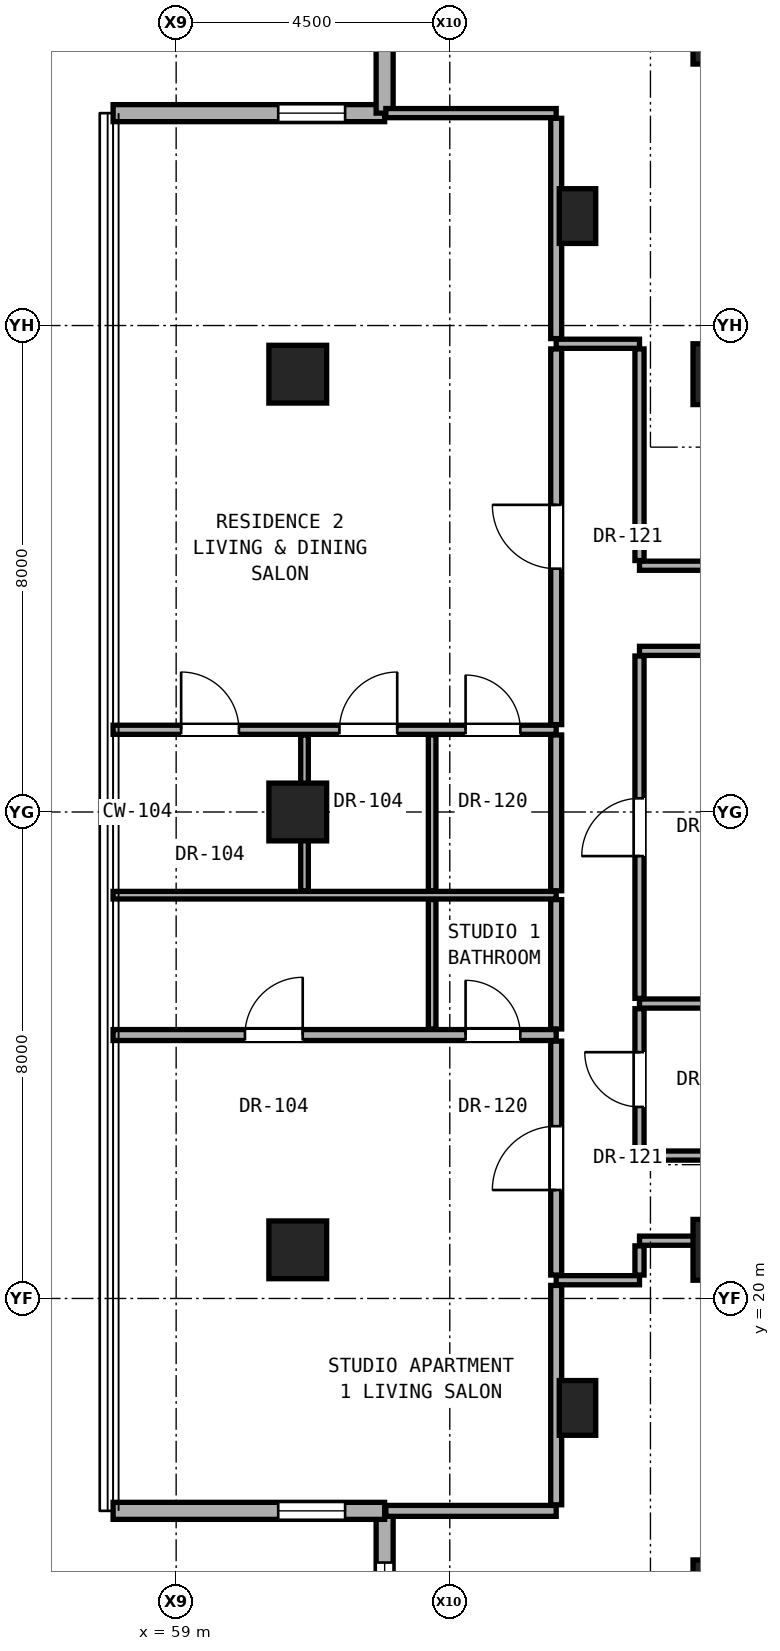
"""IFC4 building model, lengths in metres.
Left out: names, types, materials, properties, quantities, classifications, styles, units other than length and angle.
Written with IfcOpenShell. Run it as: python <this file> out.ifc"""

import sys

from ifc_helpers import new_model, si_unit, direction, frame, frame_2d, origin, origin_2d, place, context, subcontext, project, spatial, rectangle, hollow_rectangle, extrude, element, fill, save


model = new_model("IFC4")
c1 = context("Model", 3, precision=1e-05, world=origin(), true_north=direction((0.0, 1.0)))
c2 = subcontext(c1, "Body", "Model", "MODEL_VIEW")
j1 = project(units=[si_unit("LENGTHUNIT", "METRE"), si_unit("PLANEANGLEUNIT", "RADIAN")], contexts=[c1])
p1 = place(None, origin())
s1 = spatial("IfcSite", under=j1, at=p1, CompositionType="ELEMENT")
p2 = place(p1, origin())
s2 = spatial("IfcBuilding", under=s1, at=p2, CompositionType="ELEMENT")
p3 = place(p2, frame((0.0, 0.0, 180.4)))
s3 = spatial("IfcBuildingStorey", under=s2, at=p3, CompositionType="ELEMENT", Elevation=180.4)
for number, where, z_axis, x_axis in (
    (1, (68.0, 15.2, 0.0), (0.0, 0.0, 1.0), (1.0, 0.0, 0.0)),
    (2, (68.0, 20.8, 0.0), (0.0, 0.0, 1.0), (1.0, 0.0, 0.0)),
    (3, (68.0, 35.2, 0.0), (0.0, 0.0, 1.0), (1.0, 0.0, 0.0)),
    (4, (68.0, 40.8, 0.0), (0.0, 0.0, 1.0), (1.0, 0.0, 0.0)),
):
    element("IfcColumn", number, at=place(p3, frame(where, z_axis=z_axis, x_axis=x_axis)), inside=s3, PredefinedType="COLUMN", context=c2, shape_type="SweptSolid", body=[
        extrude(rectangle(XDim=1.0, YDim=1.0, at=origin_2d()), origin(), (0.0, 0.0, 1.0), 3.25),
    ])
for number, where, z_axis, x_axis in (
    (5, (61.0, 20.8, 0.0), (0.0, 0.0, 1.0), (1.0, 0.0, 0.0)),
    (6, (61.0, 28.0, 0.0), (0.0, 0.0, 1.0), (1.0, 0.0, 0.0)),
    (7, (61.0, 35.2, 0.0), (0.0, 0.0, 1.0), (1.0, 0.0, 0.0)),
):
    element("IfcColumn", number, at=place(p3, frame(where, z_axis=z_axis, x_axis=x_axis)), inside=s3, PredefinedType="COLUMN", context=c2, shape_type="SweptSolid", body=[
        extrude(hollow_rectangle(XDim=0.95, YDim=0.95, WallThickness=0.05, at=origin_2d()), origin(), (0.0, 0.0, 1.0), 3.25),
    ])
for number, where, z_axis, x_axis in (
    (8, (65.6, 18.2, 0.0), (0.0, 0.0, 1.0), (1.0, 0.0, 0.0)),
    (9, (65.6, 37.8, 0.0), (0.0, 0.0, 1.0), (1.0, 0.0, 0.0)),
):
    element("IfcColumn", number, at=place(p3, frame(where, z_axis=z_axis, x_axis=x_axis)), inside=s3, PredefinedType="PILASTER", context=c2, shape_type="SweptSolid", body=[
        extrude(rectangle(XDim=0.6, YDim=0.9, at=origin_2d()), origin(), (0.0, 0.0, 1.0), 3.25),
    ])
p4 = place(p3, frame((62.429, 16.507, 0.0), z_axis=(0.0, 0.0, 1.0), x_axis=(0.0, -1.0, 0.0)))
e10 = element("IfcWall", 10, at=p4, inside=s3, PredefinedType="SOLIDWALL", context=c2, shape_type="SweptSolid", body=[
    extrude(rectangle(XDim=4.465, YDim=0.28, at=frame_2d((2.233, 0.0))), origin(), (0.0, 0.0, 1.0), 3.03),
])
p5 = place(p4, frame((0.85, 0.0, 0.53)))
e11 = element("IfcOpeningElement", 11, at=p5, cuts=e10, PredefinedType="OPENING", context=c2, shape_type="SweptSolid", body=[
    extrude(rectangle(XDim=2.4, YDim=2.35, at=frame_2d((1.2, 1.175))), frame((0.0, 0.15, 0.0), z_axis=(0.0, -1.0, 0.0), x_axis=(1.0, 0.0, 0.0)), (0.0, 0.0, 1.0), 0.3),
])
p6 = place(p3, frame((57.963, 16.507, 0.0), z_axis=(0.0, 0.0, 1.0), x_axis=(1.0, 0.0, 0.0)))
e12 = element("IfcWall", 12, at=p6, inside=s3, PredefinedType="SOLIDWALL", context=c2, shape_type="SweptSolid", body=[
    extrude(rectangle(XDim=4.465, YDim=0.28, at=frame_2d((2.233, 0.0))), origin(), (0.0, 0.0, 1.0), 3.03),
])
p7 = place(p6, frame((2.715, 0.0, 0.85)))
e13 = element("IfcOpeningElement", 13, at=p7, cuts=e12, PredefinedType="OPENING", context=c2, shape_type="SweptSolid", body=[
    extrude(rectangle(XDim=1.1, YDim=2.0, at=frame_2d((0.55, 1.0))), frame((0.0, 0.15, 0.0), z_axis=(0.0, -1.0, 0.0), x_axis=(1.0, 0.0, 0.0)), (0.0, 0.0, 1.0), 0.3),
])
p8 = place(p3, frame((62.429, 39.493, 0.0), z_axis=(0.0, 0.0, 1.0), x_axis=(-1.0, 0.0, 0.0)))
e14 = element("IfcWall", 14, at=p8, inside=s3, PredefinedType="SOLIDWALL", context=c2, shape_type="SweptSolid", body=[
    extrude(rectangle(XDim=4.465, YDim=0.28, at=frame_2d((2.233, 0.0))), origin(), (0.0, 0.0, 1.0), 3.03),
])
p9 = place(p8, frame((0.65, 0.0, 0.85)))
e15 = element("IfcOpeningElement", 15, at=p9, cuts=e14, PredefinedType="OPENING", context=c2, shape_type="SweptSolid", body=[
    extrude(rectangle(XDim=1.1, YDim=2.0, at=frame_2d((0.55, 1.0))), frame((0.0, 0.15, 0.0), z_axis=(0.0, -1.0, 0.0), x_axis=(1.0, 0.0, 0.0)), (0.0, 0.0, 1.0), 0.3),
])
p10 = place(p3, frame((62.429, 43.958, 0.0), z_axis=(0.0, 0.0, 1.0), x_axis=(0.0, -1.0, 0.0)))
e16 = element("IfcWall", 16, at=p10, inside=s3, PredefinedType="SOLIDWALL", context=c2, shape_type="SweptSolid", body=[
    extrude(rectangle(XDim=4.465, YDim=0.28, at=frame_2d((2.233, 0.0))), origin(), (0.0, 0.0, 1.0), 3.03),
])
p11 = place(p3, frame((62.449, 16.507, 0.0), z_axis=(0.0, 0.0, 1.0), x_axis=(1.0, 0.0, 0.0)))
e17 = element("IfcWall", 17, at=p11, inside=s3, PredefinedType="PARTITIONING", context=c2, shape_type="SweptSolid", body=[
    extrude(rectangle(XDim=2.801, YDim=0.18, at=frame_2d((1.401, 0.0))), origin(), (0.0, 0.0, 1.0), 3.05),
])
p12 = place(p3, frame((65.25, 20.3, 0.0), z_axis=(0.0, 0.0, 1.0), x_axis=(1.0, 0.0, 0.0)))
e18 = element("IfcWall", 18, at=p12, inside=s3, PredefinedType="PARTITIONING", context=c2, shape_type="SweptSolid", body=[
    extrude(rectangle(XDim=1.37, YDim=0.15, at=frame_2d((0.685, 0.0))), origin(), (0.0, 0.0, 1.0), 3.05),
])
p13 = place(p3, frame((66.62, 20.95, 0.0), z_axis=(0.0, 0.0, 1.0), x_axis=(1.0, 0.0, 0.0)))
e19 = element("IfcWall", 19, at=p13, inside=s3, PredefinedType="PARTITIONING", context=c2, shape_type="SweptSolid", body=[
    extrude(rectangle(XDim=1.11, YDim=0.15, at=frame_2d((0.555, 0.0))), origin(), (0.0, 0.0, 1.0), 2.442),
])
p14 = place(p3, frame((66.62, 22.35, 0.0), z_axis=(0.0, 0.0, 1.0), x_axis=(1.0, 0.0, 0.0)))
e20 = element("IfcWall", 20, at=p14, inside=s3, PredefinedType="PARTITIONING", context=c2, shape_type="SweptSolid", body=[
    extrude(rectangle(XDim=10.14, YDim=0.15, at=frame_2d((5.07, 0.0))), origin(), (0.0, 0.0, 1.0), 2.186),
])
p15 = place(p3, frame((57.963, 24.332, 0.0), z_axis=(0.0, 0.0, 1.0), x_axis=(1.0, 0.0, 0.0)))
e21 = element("IfcWall", 21, at=p15, inside=s3, PredefinedType="PARTITIONING", context=c2, shape_type="SweptSolid", body=[
    extrude(rectangle(XDim=7.287, YDim=0.18, at=frame_2d((3.644, 0.0))), origin(), (0.0, 0.0, 1.0), 2.269),
])
p16 = place(p15, frame((2.168, 0.0, 0.0)))
e22 = element("IfcOpeningElement", 22, at=p16, cuts=e21, PredefinedType="OPENING", context=c2, shape_type="SweptSolid", body=[
    extrude(rectangle(XDim=0.95, YDim=2.15, at=frame_2d((0.475, 1.075))), frame((0.0, 0.1, 0.0), z_axis=(0.0, -1.0, 0.0), x_axis=(1.0, 0.0, 0.0)), (0.0, 0.0, 1.0), 0.2),
])
p17 = place(p15, frame((5.797, 0.0, 0.0)))
e23 = element("IfcOpeningElement", 23, at=p17, cuts=e21, PredefinedType="OPENING", context=c2, shape_type="SweptSolid", body=[
    extrude(rectangle(XDim=0.9, YDim=2.1, at=frame_2d((0.45, 1.05))), frame((0.0, 0.1, 0.0), z_axis=(0.0, -1.0, 0.0), x_axis=(1.0, 0.0, 0.0)), (0.0, 0.0, 1.0), 0.2),
])
p18 = place(p3, frame((66.62, 24.85, 0.0), z_axis=(0.0, 0.0, 1.0), x_axis=(1.0, 0.0, 0.0)))
e24 = element("IfcWall", 24, at=p18, inside=s3, PredefinedType="PARTITIONING", context=c2, shape_type="SweptSolid", body=[
    extrude(rectangle(XDim=3.13, YDim=0.15, at=frame_2d((1.565, 0.0))), origin(), (0.0, 0.0, 1.0), 2.186),
])
p19 = place(p3, frame((57.963, 26.632, 0.0), z_axis=(0.0, 0.0, 1.0), x_axis=(1.0, 0.0, 0.0)))
e25 = element("IfcWall", 25, at=p19, inside=s3, PredefinedType="PARTITIONING", context=c2, shape_type="SweptSolid", body=[
    extrude(rectangle(XDim=7.287, YDim=0.125, at=frame_2d((3.644, 0.0))), origin(), (0.0, 0.0, 1.0), 2.269),
])
p20 = place(p3, frame((57.963, 29.352, 0.0), z_axis=(0.0, 0.0, 1.0), x_axis=(1.0, 0.0, 0.0)))
e26 = element("IfcWall", 26, at=p20, inside=s3, PredefinedType="PARTITIONING", context=c2, shape_type="SweptSolid", body=[
    extrude(rectangle(XDim=7.287, YDim=0.15, at=frame_2d((3.644, 0.0))), origin(), (0.0, 0.0, 1.0), 2.269),
])
p21 = place(p20, frame((1.119, 0.0, 0.0)))
e27 = element("IfcOpeningElement", 27, at=p21, cuts=e26, PredefinedType="OPENING", context=c2, shape_type="SweptSolid", body=[
    extrude(rectangle(XDim=0.95, YDim=2.15, at=frame_2d((0.475, 1.075))), frame((0.0, 0.085, 0.0), z_axis=(0.0, -1.0, 0.0), x_axis=(1.0, 0.0, 0.0)), (0.0, 0.0, 1.0), 0.17),
])
p22 = place(p20, frame((3.722, 0.0, 0.0)))
e28 = element("IfcOpeningElement", 28, at=p22, cuts=e26, PredefinedType="OPENING", context=c2, shape_type="SweptSolid", body=[
    extrude(rectangle(XDim=0.95, YDim=2.15, at=frame_2d((0.475, 1.075))), frame((0.0, 0.085, 0.0), z_axis=(0.0, -1.0, 0.0), x_axis=(1.0, 0.0, 0.0)), (0.0, 0.0, 1.0), 0.17),
])
p23 = place(p20, frame((5.797, 0.0, 0.0)))
e29 = element("IfcOpeningElement", 29, at=p23, cuts=e26, PredefinedType="OPENING", context=c2, shape_type="SweptSolid", body=[
    extrude(rectangle(XDim=0.9, YDim=2.1, at=frame_2d((0.45, 1.05))), frame((0.0, 0.085, 0.0), z_axis=(0.0, -1.0, 0.0), x_axis=(1.0, 0.0, 0.0)), (0.0, 0.0, 1.0), 0.17),
])
p24 = place(p3, frame((66.62, 30.65, 0.0), z_axis=(0.0, 0.0, 1.0), x_axis=(1.0, 0.0, 0.0)))
e30 = element("IfcWall", 30, at=p24, inside=s3, PredefinedType="PARTITIONING", context=c2, shape_type="SweptSolid", body=[
    extrude(rectangle(XDim=10.14, YDim=0.15, at=frame_2d((5.07, 0.0))), origin(), (0.0, 0.0, 1.0), 2.186),
])
p25 = place(p24, frame((6.14, 0.0, 0.0)))
e31 = element("IfcOpeningElement", 31, at=p25, cuts=e30, PredefinedType="OPENING", context=c2, shape_type="SweptSolid", body=[
    extrude(rectangle(XDim=0.95, YDim=2.15, at=frame_2d((0.475, 1.075))), frame((0.0, 0.085, 0.0), z_axis=(0.0, -1.0, 0.0), x_axis=(1.0, 0.0, 0.0)), (0.0, 0.0, 1.0), 0.17),
])
p26 = place(p3, frame((66.62, 32.05, 0.0), z_axis=(0.0, 0.0, 1.0), x_axis=(1.0, 0.0, 0.0)))
e32 = element("IfcWall", 32, at=p26, inside=s3, PredefinedType="PARTITIONING", context=c2, shape_type="SweptSolid", body=[
    extrude(rectangle(XDim=2.18, YDim=0.15, at=frame_2d((1.09, 0.0))), origin(), (0.0, 0.0, 1.0), 2.186),
])
p27 = place(p3, frame((65.25, 35.7, 0.0), z_axis=(0.0, 0.0, 1.0), x_axis=(1.0, 0.0, 0.0)))
e33 = element("IfcWall", 33, at=p27, inside=s3, PredefinedType="PARTITIONING", context=c2, shape_type="SweptSolid", body=[
    extrude(rectangle(XDim=1.37, YDim=0.15, at=frame_2d((0.685, 0.0))), origin(), (0.0, 0.0, 1.0), 3.05),
])
p28 = place(p3, frame((62.449, 39.493, 0.0), z_axis=(0.0, 0.0, 1.0), x_axis=(1.0, 0.0, 0.0)))
e34 = element("IfcWall", 34, at=p28, inside=s3, PredefinedType="PARTITIONING", context=c2, shape_type="SweptSolid", body=[
    extrude(rectangle(XDim=2.801, YDim=0.15, at=frame_2d((1.401, 0.0))), origin(), (0.0, 0.0, 1.0), 3.05),
])
p29 = place(p3, frame((61.111, 26.705, 0.0), z_axis=(0.0, 0.0, 1.0), x_axis=(0.0, 1.0, 0.0)))
e35 = element("IfcWall", 35, at=p29, inside=s3, PredefinedType="PARTITIONING", context=c2, shape_type="SweptSolid", body=[
    extrude(rectangle(XDim=2.562, YDim=0.125, at=frame_2d((1.281, 0.0))), origin(), (0.0, 0.0, 1.0), 2.269),
])
p30 = place(p3, frame((63.21, 24.432, 0.0), z_axis=(0.0, 0.0, 1.0), x_axis=(0.0, 1.0, 0.0)))
e36 = element("IfcWall", 36, at=p30, inside=s3, PredefinedType="PARTITIONING", context=c2, shape_type="SweptSolid", body=[
    extrude(rectangle(XDim=2.128, YDim=0.125, at=frame_2d((1.064, 0.0))), origin(), (0.0, 0.0, 1.0), 3.05),
])
p31 = place(p3, frame((63.21, 26.705, 0.0), z_axis=(0.0, 0.0, 1.0), x_axis=(0.0, 1.0, 0.0)))
e37 = element("IfcWall", 37, at=p31, inside=s3, PredefinedType="PARTITIONING", context=c2, shape_type="SweptSolid", body=[
    extrude(rectangle(XDim=2.562, YDim=0.125, at=frame_2d((1.281, 0.0))), origin(), (0.0, 0.0, 1.0), 2.346),
])
p32 = place(p3, frame((65.25, 16.607, 0.0), z_axis=(0.0, 0.0, 1.0), x_axis=(0.0, 1.0, 0.0)))
e38 = element("IfcWall", 38, at=p32, inside=s3, PredefinedType="PARTITIONING", context=c2, shape_type="SweptSolid", body=[
    extrude(rectangle(XDim=3.608, YDim=0.18, at=frame_2d((1.804, 0.0))), origin(), (0.0, 0.0, 1.0), 2.493),
])
p33 = place(p3, frame((65.25, 20.385, 0.0), z_axis=(0.0, 0.0, 1.0), x_axis=(0.0, 1.0, 0.0)))
e39 = element("IfcWall", 39, at=p33, inside=s3, PredefinedType="PARTITIONING", context=c2, shape_type="SweptSolid", body=[
    extrude(rectangle(XDim=3.847, YDim=0.18, at=frame_2d((1.923, 0.0))), origin(), (0.0, 0.0, 1.0), 2.442),
])
p34 = place(p33, frame((1.398, 0.0, 0.0)))
e40 = element("IfcOpeningElement", 40, at=p34, cuts=e39, PredefinedType="OPENING", context=c2, shape_type="SweptSolid", body=[
    extrude(rectangle(XDim=1.05, YDim=2.2, at=frame_2d((0.525, 1.1))), frame((0.0, 0.1, 0.0), z_axis=(0.0, -1.0, 0.0), x_axis=(1.0, 0.0, 0.0)), (0.0, 0.0, 1.0), 0.2),
])
p35 = place(p3, frame((65.25, 24.432, 0.0), z_axis=(0.0, 0.0, 1.0), x_axis=(0.0, 1.0, 0.0)))
e41 = element("IfcWall", 41, at=p35, inside=s3, PredefinedType="PARTITIONING", context=c2, shape_type="SweptSolid", body=[
    extrude(rectangle(XDim=2.128, YDim=0.18, at=frame_2d((1.064, 0.0))), origin(), (0.0, 0.0, 1.0), 3.05),
])
p36 = place(p3, frame((65.25, 26.705, 0.0), z_axis=(0.0, 0.0, 1.0), x_axis=(0.0, 1.0, 0.0)))
e42 = element("IfcWall", 42, at=p36, inside=s3, PredefinedType="PARTITIONING", context=c2, shape_type="SweptSolid", body=[
    extrude(rectangle(XDim=2.562, YDim=0.18, at=frame_2d((1.281, 0.0))), origin(), (0.0, 0.0, 1.0), 2.346),
])
p37 = place(p3, frame((65.25, 29.437, 0.0), z_axis=(0.0, 0.0, 1.0), x_axis=(0.0, 1.0, 0.0)))
e43 = element("IfcWall", 43, at=p37, inside=s3, PredefinedType="PARTITIONING", context=c2, shape_type="SweptSolid", body=[
    extrude(rectangle(XDim=6.178, YDim=0.18, at=frame_2d((3.089, 0.0))), origin(), (0.0, 0.0, 1.0), 2.442),
])
p38 = place(p37, frame((2.564, 0.0, 0.0)))
e44 = element("IfcOpeningElement", 44, at=p38, cuts=e43, PredefinedType="OPENING", context=c2, shape_type="SweptSolid", body=[
    extrude(rectangle(XDim=1.05, YDim=2.2, at=frame_2d((0.525, 1.1))), frame((0.0, 0.1, 0.0), z_axis=(0.0, -1.0, 0.0), x_axis=(1.0, 0.0, 0.0)), (0.0, 0.0, 1.0), 0.2),
])
p39 = place(p3, frame((65.25, 35.785, 0.0), z_axis=(0.0, 0.0, 1.0), x_axis=(0.0, 1.0, 0.0)))
e45 = element("IfcWall", 45, at=p39, inside=s3, PredefinedType="PARTITIONING", context=c2, shape_type="SweptSolid", body=[
    extrude(rectangle(XDim=3.623, YDim=0.18, at=frame_2d((1.812, 0.0))), origin(), (0.0, 0.0, 1.0), 2.493),
])
p40 = place(p3, frame((66.62, 20.385, 0.0), z_axis=(0.0, 0.0, 1.0), x_axis=(0.0, 1.0, 0.0)))
e46 = element("IfcWall", 46, at=p40, inside=s3, PredefinedType="PARTITIONING", context=c2, shape_type="SweptSolid", body=[
    extrude(rectangle(XDim=0.48, YDim=0.15, at=frame_2d((0.24, 0.0))), origin(), (0.0, 0.0, 1.0), 2.442),
])
p41 = place(p3, frame((66.62, 22.435, 0.0), z_axis=(0.0, 0.0, 1.0), x_axis=(0.0, 1.0, 0.0)))
e47 = element("IfcWall", 47, at=p41, inside=s3, PredefinedType="PARTITIONING", context=c2, shape_type="SweptSolid", body=[
    extrude(rectangle(XDim=2.33, YDim=0.15, at=frame_2d((1.165, 0.0))), origin(), (0.0, 0.0, 1.0), 3.05),
])
p42 = place(p41, frame((0.715, 0.0, 0.0)))
e48 = element("IfcOpeningElement", 48, at=p42, cuts=e47, PredefinedType="OPENING", context=c2, shape_type="SweptSolid", body=[
    extrude(rectangle(XDim=0.9, YDim=2.1, at=frame_2d((0.45, 1.05))), frame((0.0, 0.085, 0.0), z_axis=(0.0, -1.0, 0.0), x_axis=(1.0, 0.0, 0.0)), (0.0, 0.0, 1.0), 0.17),
])
p43 = place(p3, frame((66.62, 24.935, 0.0), z_axis=(0.0, 0.0, 1.0), x_axis=(0.0, 1.0, 0.0)))
e49 = element("IfcWall", 49, at=p43, inside=s3, PredefinedType="PARTITIONING", context=c2, shape_type="SweptSolid", body=[
    extrude(rectangle(XDim=5.63, YDim=0.15, at=frame_2d((2.815, 0.0))), origin(), (0.0, 0.0, 1.0), 2.346),
])
p44 = place(p43, frame((2.34, 0.0, 0.0)))
e50 = element("IfcOpeningElement", 50, at=p44, cuts=e49, PredefinedType="OPENING", context=c2, shape_type="SweptSolid", body=[
    extrude(rectangle(XDim=0.95, YDim=2.15, at=frame_2d((0.475, 1.075))), frame((0.0, 0.085, 0.0), z_axis=(0.0, -1.0, 0.0), x_axis=(1.0, 0.0, 0.0)), (0.0, 0.0, 1.0), 0.17),
])
p45 = place(p3, frame((66.62, 32.135, 0.0), z_axis=(0.0, 0.0, 1.0), x_axis=(0.0, 1.0, 0.0)))
e51 = element("IfcWall", 51, at=p45, inside=s3, PredefinedType="PARTITIONING", context=c2, shape_type="SweptSolid", body=[
    extrude(rectangle(XDim=3.48, YDim=0.15, at=frame_2d((1.74, 0.0))), origin(), (0.0, 0.0, 1.0), 2.442),
])
p46 = place(p5, origin())
e52 = element("IfcWindow", 52, at=p46, inside=s3, PartitioningType="SINGLE_PANEL", PredefinedType="WINDOW", context=c2, shape_type="SweptSolid", body=[
    extrude(rectangle(XDim=2.4, YDim=2.35, at=frame_2d((1.2, 1.175))), frame((0.0, 0.03, 0.0), z_axis=(0.0, -1.0, 0.0), x_axis=(1.0, 0.0, 0.0)), (0.0, 0.0, 1.0), 0.06),
])
fill(e11, e52)
p47 = place(p7, origin())
e53 = element("IfcWindow", 53, at=p47, inside=s3, PartitioningType="SINGLE_PANEL", PredefinedType="WINDOW", context=c2, shape_type="SweptSolid", body=[
    extrude(rectangle(XDim=1.1, YDim=2.0, at=frame_2d((0.55, 1.0))), frame((0.0, 0.03, 0.0), z_axis=(0.0, -1.0, 0.0), x_axis=(1.0, 0.0, 0.0)), (0.0, 0.0, 1.0), 0.06),
])
fill(e13, e53)
p48 = place(p9, origin())
e54 = element("IfcWindow", 54, at=p48, inside=s3, PartitioningType="SINGLE_PANEL", PredefinedType="WINDOW", context=c2, shape_type="SweptSolid", body=[
    extrude(rectangle(XDim=1.1, YDim=2.0, at=frame_2d((0.55, 1.0))), frame((0.0, 0.03, 0.0), z_axis=(0.0, -1.0, 0.0), x_axis=(1.0, 0.0, 0.0)), (0.0, 0.0, 1.0), 0.06),
])
fill(e15, e54)
p49 = place(p42, origin())
e55 = element("IfcDoor", 55, at=p49, inside=s3, OperationType="SINGLE_SWING_RIGHT", PredefinedType="DOOR", context=c2, shape_type="SweptSolid", body=[
    extrude(rectangle(XDim=0.9, YDim=2.1, at=frame_2d((0.45, 1.05))), frame((0.0, 0.025, 0.0), z_axis=(0.0, -1.0, 0.0), x_axis=(1.0, 0.0, 0.0)), (0.0, 0.0, 1.0), 0.05),
])
fill(e48, e55)
p50 = place(p34, origin())
e56 = element("IfcDoor", 56, at=p50, inside=s3, OperationType="SINGLE_SWING_LEFT", PredefinedType="DOOR", context=c2, shape_type="SweptSolid", body=[
    extrude(rectangle(XDim=1.05, YDim=2.2, at=frame_2d((0.525, 1.1))), frame((0.0, 0.025, 0.0), z_axis=(0.0, -1.0, 0.0), x_axis=(1.0, 0.0, 0.0)), (0.0, 0.0, 1.0), 0.05),
])
fill(e40, e56)
p51 = place(p16, origin())
e57 = element("IfcDoor", 57, at=p51, inside=s3, OperationType="SINGLE_SWING_RIGHT", PredefinedType="DOOR", context=c2, shape_type="SweptSolid", body=[
    extrude(rectangle(XDim=0.95, YDim=2.15, at=frame_2d((0.475, 1.075))), frame((0.0, 0.025, 0.0), z_axis=(0.0, -1.0, 0.0), x_axis=(1.0, 0.0, 0.0)), (0.0, 0.0, 1.0), 0.05),
])
fill(e22, e57)
p52 = place(p17, origin())
e58 = element("IfcDoor", 58, at=p52, inside=s3, OperationType="SINGLE_SWING_LEFT", PredefinedType="DOOR", context=c2, shape_type="SweptSolid", body=[
    extrude(rectangle(XDim=0.9, YDim=2.1, at=frame_2d((0.45, 1.05))), frame((0.0, 0.025, 0.0), z_axis=(0.0, -1.0, 0.0), x_axis=(1.0, 0.0, 0.0)), (0.0, 0.0, 1.0), 0.05),
])
fill(e23, e58)
p53 = place(p38, origin())
e59 = element("IfcDoor", 59, at=p53, inside=s3, OperationType="SINGLE_SWING_RIGHT", PredefinedType="DOOR", context=c2, shape_type="SweptSolid", body=[
    extrude(rectangle(XDim=1.05, YDim=2.2, at=frame_2d((0.525, 1.1))), frame((0.0, 0.025, 0.0), z_axis=(0.0, -1.0, 0.0), x_axis=(1.0, 0.0, 0.0)), (0.0, 0.0, 1.0), 0.05),
])
fill(e44, e59)
p54 = place(p21, origin())
e60 = element("IfcDoor", 60, at=p54, inside=s3, OperationType="SINGLE_SWING_LEFT", PredefinedType="DOOR", context=c2, shape_type="SweptSolid", body=[
    extrude(rectangle(XDim=0.95, YDim=2.15, at=frame_2d((0.475, 1.075))), frame((0.0, 0.025, 0.0), z_axis=(0.0, -1.0, 0.0), x_axis=(1.0, 0.0, 0.0)), (0.0, 0.0, 1.0), 0.05),
])
fill(e27, e60)
p55 = place(p22, origin())
e61 = element("IfcDoor", 61, at=p55, inside=s3, OperationType="SINGLE_SWING_RIGHT", PredefinedType="DOOR", context=c2, shape_type="SweptSolid", body=[
    extrude(rectangle(XDim=0.95, YDim=2.15, at=frame_2d((0.475, 1.075))), frame((0.0, 0.025, 0.0), z_axis=(0.0, -1.0, 0.0), x_axis=(1.0, 0.0, 0.0)), (0.0, 0.0, 1.0), 0.05),
])
fill(e28, e61)
p56 = place(p23, origin())
e62 = element("IfcDoor", 62, at=p56, inside=s3, OperationType="SINGLE_SWING_LEFT", PredefinedType="DOOR", context=c2, shape_type="SweptSolid", body=[
    extrude(rectangle(XDim=0.9, YDim=2.1, at=frame_2d((0.45, 1.05))), frame((0.0, 0.025, 0.0), z_axis=(0.0, -1.0, 0.0), x_axis=(1.0, 0.0, 0.0)), (0.0, 0.0, 1.0), 0.05),
])
fill(e29, e62)
p57 = place(p44, origin())
e63 = element("IfcDoor", 63, at=p57, inside=s3, OperationType="SINGLE_SWING_LEFT", PredefinedType="DOOR", context=c2, shape_type="SweptSolid", body=[
    extrude(rectangle(XDim=0.95, YDim=2.15, at=frame_2d((0.475, 1.075))), frame((0.0, 0.025, 0.0), z_axis=(0.0, -1.0, 0.0), x_axis=(1.0, 0.0, 0.0)), (0.0, 0.0, 1.0), 0.05),
])
fill(e50, e63)
save(model, sys.argv[1])
